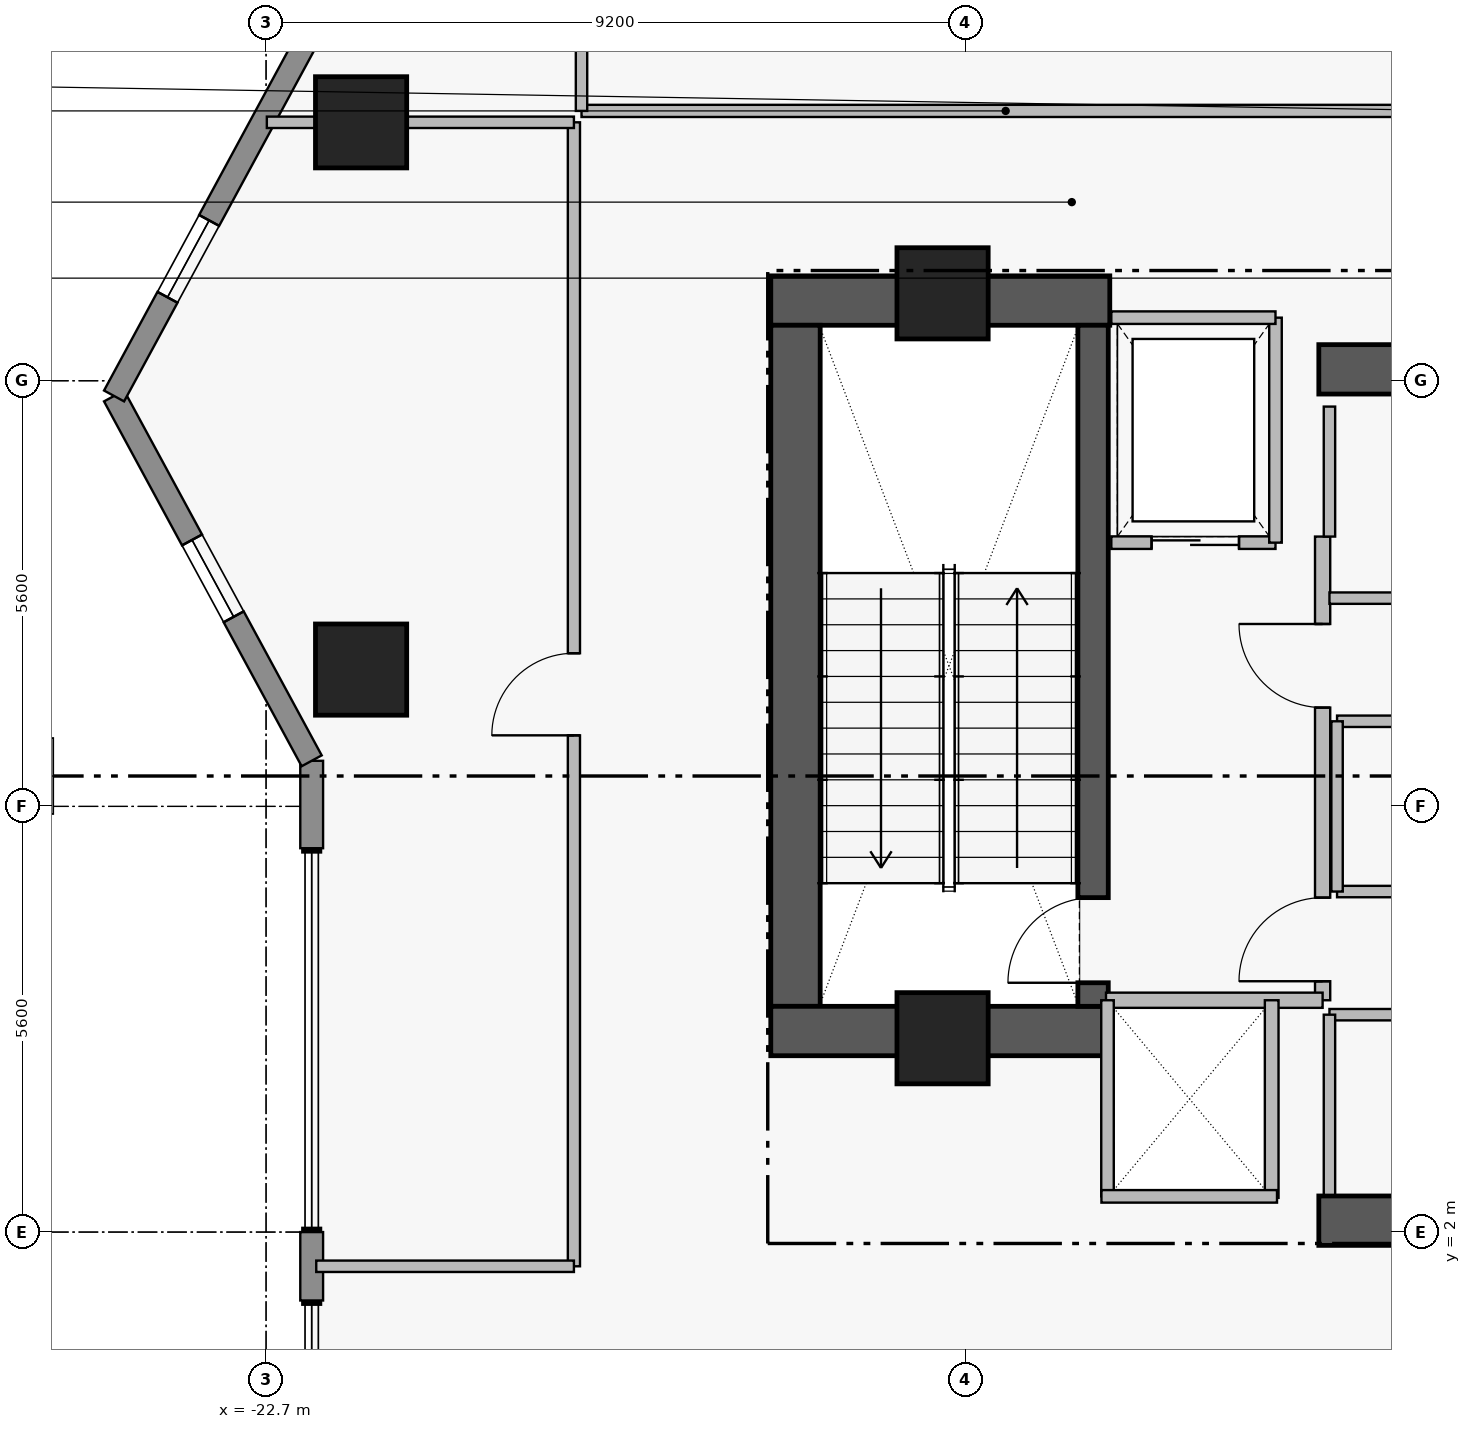
"""IFC4 building model, lengths in metres.
Left out: names, types, materials, properties, quantities, classifications, styles, units other than length and angle.
Written with IfcOpenShell. Run it as: python <this file> out.ifc"""

import sys

from ifc_helpers import new_model, si_unit, direction, frame, frame_2d, origin, origin_2d, place, context, subcontext, project, spatial, rectangle, extrude, element, fill, save


model = new_model("IFC4")
c1 = context("Model", 3, precision=1e-05, world=origin(), true_north=direction((0.0, 1.0)))
c2 = subcontext(c1, "Body", "Model", "MODEL_VIEW")
j1 = project(units=[si_unit("LENGTHUNIT", "METRE"), si_unit("PLANEANGLEUNIT", "RADIAN")], contexts=[c1])
p1 = place(None, origin())
s1 = spatial("IfcSite", under=j1, at=p1, CompositionType="ELEMENT")
p2 = place(p1, origin())
s2 = spatial("IfcBuilding", under=s1, at=p2, CompositionType="ELEMENT")
p3 = place(p2, frame((0.0, 0.0, 168.2)))
s3 = spatial("IfcBuildingStorey", under=s2, at=p3, CompositionType="ELEMENT", Elevation=168.2)
p4 = place(p3, frame((-16.06, 14.255, 0.0), z_axis=(0.0, 0.0, 1.0), x_axis=(1.0, 0.0, 0.0)))
e1 = element("IfcWall", 1, at=p4, inside=s3, PredefinedType="SHEAR", context=c2, shape_type="SweptSolid", body=[
    extrude(rectangle(XDim=4.46, YDim=0.65, at=frame_2d((2.23, 0.0))), origin(), (0.0, 0.0, 1.0), 4.41),
])
p5 = place(p3, frame((-15.735, 4.97, 0.0), z_axis=(0.0, 0.0, 1.0), x_axis=(0.0, 1.0, 0.0)))
e2 = element("IfcWall", 2, at=p5, inside=s3, PredefinedType="SHEAR", context=c2, shape_type="SweptSolid", body=[
    extrude(rectangle(XDim=8.96, YDim=0.65, at=frame_2d((4.48, 0.0))), origin(), (0.0, 0.0, 1.0), 4.41),
])
p6 = place(p3, frame((-16.06, 4.645, 0.0), z_axis=(0.0, 0.0, 1.0), x_axis=(1.0, 0.0, 0.0)))
e3 = element("IfcWall", 3, at=p6, inside=s3, PredefinedType="SHEAR", context=c2, shape_type="SweptSolid", body=[
    extrude(rectangle(XDim=4.46, YDim=0.65, at=frame_2d((2.23, 0.0))), origin(), (0.0, 0.0, 1.0), 4.41),
])
for number, where, z_axis, x_axis in (
    (4, (-8.85, 2.15, 0.0), (0.0, 0.0, 1.0), (1.0, 0.0, 0.0)),
    (5, (-8.85, 13.35, 0.0), (0.0, 0.0, 1.0), (1.0, 0.0, 0.0)),
):
    element("IfcWall", number, at=place(p3, frame(where, z_axis=z_axis, x_axis=x_axis)), inside=s3, PredefinedType="SHEAR", context=c2, shape_type="SweptSolid", body=[
        extrude(rectangle(XDim=7.6, YDim=0.65, at=frame_2d((3.8, 0.0))), origin(), (0.0, 0.0, 1.0), 4.38),
    ])
p7 = place(p3, frame((-11.82, 4.97, 0.0), z_axis=(0.0, 0.0, 1.0), x_axis=(0.0, 1.0, 0.0)))
e6 = element("IfcWall", 6, at=p7, inside=s3, PredefinedType="SHEAR", context=c2, shape_type="SweptSolid", body=[
    extrude(rectangle(XDim=8.96, YDim=0.4, at=frame_2d((4.48, 0.0))), origin(), (0.0, 0.0, 1.0), 4.41),
])
p8 = place(p7, frame((0.31, 0.0, 0.0)))
e7 = element("IfcOpeningElement", 7, at=p8, cuts=e6, PredefinedType="OPENING", context=c2, shape_type="SweptSolid", body=[
    extrude(rectangle(XDim=1.12, YDim=2.22, at=frame_2d((0.56, 1.11))), frame((0.0, 0.21, 0.0), z_axis=(0.0, -1.0, 0.0), x_axis=(1.0, 0.0, 0.0)), (0.0, 0.0, 1.0), 0.42),
])
for number, where, z_axis, x_axis in (
    (8, (-13.8, 14.35, 0.0), (0.0, 0.0, 1.0), (1.0, 0.0, 0.0)),
    (9, (-13.8, 4.55, 0.0), (0.0, 0.0, 1.0), (1.0, 0.0, 0.0)),
):
    element("IfcColumn", number, at=place(p3, frame(where, z_axis=z_axis, x_axis=x_axis)), inside=s3, PredefinedType="COLUMN", context=c2, shape_type="SweptSolid", body=[
        extrude(rectangle(XDim=1.2, YDim=1.2, at=origin_2d()), origin(), (0.0, 0.0, 1.0), 4.6),
    ])
for number, where, z_axis, x_axis in (
    (10, (-21.45, 9.4, 0.43), (0.0, 0.0, 1.0), (1.0, 0.0, 0.0)),
    (11, (-21.45, 16.6, 0.43), (0.0, 0.0, 1.0), (1.0, 0.0, 0.0)),
):
    element("IfcColumn", number, at=place(p3, frame(where, z_axis=z_axis, x_axis=x_axis)), inside=s3, PredefinedType="COLUMN", context=c2, shape_type="SweptSolid", body=[
        extrude(rectangle(XDim=1.2, YDim=1.2, at=origin_2d()), origin(), (0.0, 0.0, 1.0), 4.17),
    ])
p9 = place(p3, frame((-22.1, 1.1, 0.0), z_axis=(0.0, 0.0, 1.0), x_axis=(0.0, 1.0, 0.0)))
e12 = element("IfcWall", 12, at=p9, inside=s3, PredefinedType="STANDARD", context=c2, shape_type="SweptSolid", body=[
    extrude(rectangle(XDim=0.9, YDim=0.3, at=frame_2d((0.45, 0.0))), origin(), (0.0, 0.0, 1.0), 4.38),
])
p10 = place(p3, frame((-22.1, 7.05, 0.0), z_axis=(0.0, 0.0, 1.0), x_axis=(0.0, 1.0, 0.0)))
e13 = element("IfcWall", 13, at=p10, inside=s3, PredefinedType="STANDARD", context=c2, shape_type="SweptSolid", body=[
    extrude(rectangle(XDim=1.15, YDim=0.3, at=frame_2d((0.575, 0.0))), origin(), (0.0, 0.0, 1.0), 4.38),
])
p11 = place(p3, frame((-22.1, 8.2, 0.0), z_axis=(0.0, 0.0, 1.0), x_axis=(-0.476258655584, 0.879305233114, 0.0)))
e14 = element("IfcWall", 14, at=p11, inside=s3, PredefinedType="STANDARD", context=c2, shape_type="SweptSolid", body=[
    extrude(rectangle(XDim=5.459, YDim=0.3, at=frame_2d((2.729, 0.0))), origin(), (0.0, 0.0, 1.0), 4.38),
])
p12 = place(p11, frame((2.155, 0.0, 1.25)))
e15 = element("IfcOpeningElement", 15, at=p12, cuts=e14, PredefinedType="OPENING", context=c2, shape_type="SweptSolid", body=[
    extrude(rectangle(XDim=1.15, YDim=1.55, at=frame_2d((0.575, 0.775))), frame((0.0, 0.16, 0.0), z_axis=(0.0, -1.0, 0.0), x_axis=(1.0, 0.0, 0.0)), (0.0, 0.0, 1.0), 0.32),
])
p13 = place(p3, frame((-24.7, 13.0, 0.0), z_axis=(0.0, 0.0, 1.0), x_axis=(0.476258655584, 0.879305233114, 0.0)))
e16 = element("IfcWall", 16, at=p13, inside=s3, PredefinedType="STANDARD", context=c2, shape_type="SweptSolid", body=[
    extrude(rectangle(XDim=5.459, YDim=0.3, at=frame_2d((2.729, 0.0))), origin(), (0.0, 0.0, 1.0), 4.38),
])
p14 = place(p13, frame((1.476, 0.0, 1.25)))
e17 = element("IfcOpeningElement", 17, at=p14, cuts=e16, PredefinedType="OPENING", context=c2, shape_type="SweptSolid", body=[
    extrude(rectangle(XDim=1.15, YDim=1.55, at=frame_2d((0.575, 0.775))), frame((0.0, 0.16, 0.0), z_axis=(0.0, -1.0, 0.0), x_axis=(1.0, 0.0, 0.0)), (0.0, 0.0, 1.0), 0.32),
])
p15 = place(p3, frame((-8.8, 5.05, 0.0), z_axis=(0.0, 0.0, 1.0), x_axis=(0.0, 1.0, 0.0)))
e18 = element("IfcWall", 18, at=p15, inside=s3, PredefinedType="PARTITIONING", context=c2, shape_type="SweptSolid", body=[
    extrude(rectangle(XDim=6.1, YDim=0.2, at=frame_2d((3.05, 0.0))), origin(), (0.0, 0.0, 1.0), 4.38),
])
p16 = place(p15, frame((0.25, 0.0, 0.0)))
e19 = element("IfcOpeningElement", 19, at=p16, cuts=e18, PredefinedType="OPENING", context=c2, shape_type="SweptSolid", body=[
    extrude(rectangle(XDim=1.1, YDim=2.2, at=frame_2d((0.55, 1.1))), frame((0.0, 0.11, 0.0), z_axis=(0.0, -1.0, 0.0), x_axis=(1.0, 0.0, 0.0)), (0.0, 0.0, 1.0), 0.22),
])
p17 = place(p15, frame((3.85, 0.0, 0.0)))
e20 = element("IfcOpeningElement", 20, at=p17, cuts=e18, PredefinedType="OPENING", context=c2, shape_type="SweptSolid", body=[
    extrude(rectangle(XDim=1.1, YDim=2.2, at=frame_2d((0.55, 1.1))), frame((0.0, 0.11, 0.0), z_axis=(0.0, -1.0, 0.0), x_axis=(1.0, 0.0, 0.0)), (0.0, 0.0, 1.0), 0.22),
])
p18 = place(p3, frame((-11.58, 11.07, 0.0), z_axis=(0.0, 0.0, 1.0), x_axis=(1.0, 0.0, 0.0)))
e21 = element("IfcWall", 21, at=p18, inside=s3, PredefinedType="PARTITIONING", context=c2, shape_type="SweptSolid", body=[
    extrude(rectangle(XDim=2.16, YDim=0.165, at=frame_2d((1.08, 0.0))), origin(), (0.0, 0.0, 1.0), 4.38),
])
p19 = place(p18, frame((0.53, 0.0, 0.0)))
e22 = element("IfcOpeningElement", 22, at=p19, cuts=e21, PredefinedType="OPENING", context=c2, shape_type="SweptSolid", body=[
    extrude(rectangle(XDim=1.15, YDim=2.25, at=frame_2d((0.575, 1.125))), frame((0.0, 0.093, 0.0), z_axis=(0.0, -1.0, 0.0), x_axis=(1.0, 0.0, 0.0)), (0.0, 0.0, 1.0), 0.185),
])
p20 = place(p3, frame((-8.71, 4.86, 0.0), z_axis=(0.0, 0.0, 1.0), x_axis=(1.0, 0.0, 0.0)))
e23 = element("IfcWall", 23, at=p20, inside=s3, PredefinedType="PARTITIONING", context=c2, shape_type="SweptSolid", body=[
    extrude(rectangle(XDim=4.92, YDim=0.15, at=frame_2d((2.46, 0.0))), origin(), (0.0, 0.0, 1.0), 4.38),
])
p21 = place(p20, frame((2.01, 0.0, 0.0)))
e24 = element("IfcOpeningElement", 24, at=p21, cuts=e23, PredefinedType="OPENING", context=c2, shape_type="SweptSolid", body=[
    extrude(rectangle(XDim=0.9, YDim=2.15, at=frame_2d((0.45, 1.075))), frame((0.0, 0.085, 0.0), z_axis=(0.0, -1.0, 0.0), x_axis=(1.0, 0.0, 0.0)), (0.0, 0.0, 1.0), 0.17),
])
p22 = place(p3, frame((-8.71, 10.34, 0.0), z_axis=(0.0, 0.0, 1.0), x_axis=(1.0, 0.0, 0.0)))
e25 = element("IfcWall", 25, at=p22, inside=s3, PredefinedType="PARTITIONING", context=c2, shape_type="SweptSolid", body=[
    extrude(rectangle(XDim=4.52, YDim=0.15, at=frame_2d((2.26, 0.0))), origin(), (0.0, 0.0, 1.0), 4.38),
])
p23 = place(p22, frame((1.81, 0.0, 0.0)))
e26 = element("IfcOpeningElement", 26, at=p23, cuts=e25, PredefinedType="OPENING", context=c2, shape_type="SweptSolid", body=[
    extrude(rectangle(XDim=0.9, YDim=2.15, at=frame_2d((0.45, 1.075))), frame((0.0, 0.085, 0.0), z_axis=(0.0, -1.0, 0.0), x_axis=(1.0, 0.0, 0.0)), (0.0, 0.0, 1.0), 0.17),
])
p24 = place(p3, frame((-8.61, 6.48, 0.0), z_axis=(0.0, 0.0, 1.0), x_axis=(1.0, 0.0, 0.0)))
e27 = element("IfcWall", 27, at=p24, inside=s3, PredefinedType="PARTITIONING", context=c2, shape_type="SweptSolid", body=[
    extrude(rectangle(XDim=7.29, YDim=0.15, at=frame_2d((3.645, 0.0))), origin(), (0.0, 0.0, 1.0), 4.38),
])
p25 = place(p24, frame((3.195, 0.0, 0.0)))
e28 = element("IfcOpeningElement", 28, at=p25, cuts=e27, PredefinedType="OPENING", context=c2, shape_type="SweptSolid", body=[
    extrude(rectangle(XDim=0.9, YDim=2.15, at=frame_2d((0.45, 1.075))), frame((0.0, 0.085, 0.0), z_axis=(0.0, -1.0, 0.0), x_axis=(1.0, 0.0, 0.0)), (0.0, 0.0, 1.0), 0.17),
])
p26 = place(p3, frame((-18.55, 16.75, 0.0), z_axis=(0.0, 0.0, 1.0), x_axis=(1.0, 0.0, 0.0)))
e29 = element("IfcWall", 29, at=p26, inside=s3, PredefinedType="PARTITIONING", context=c2, shape_type="SweptSolid", body=[
    extrude(rectangle(XDim=17.57, YDim=0.16, at=frame_2d((8.785, 0.0))), origin(), (0.0, 0.0, 1.0), 3.974),
])
p27 = place(p26, frame((11.16, 0.0, 0.0)))
e30 = element("IfcOpeningElement", 30, at=p27, cuts=e29, PredefinedType="OPENING", context=c2, shape_type="SweptSolid", body=[
    extrude(rectangle(XDim=1.08, YDim=2.18, at=frame_2d((0.54, 1.09))), frame((0.0, 0.09, 0.0), z_axis=(0.0, -1.0, 0.0), x_axis=(1.0, 0.0, 0.0)), (0.0, 0.0, 1.0), 0.18),
])
p28 = place(p3, frame((-18.65, 1.55, 0.0), z_axis=(0.0, 0.0, 1.0), x_axis=(0.0, 1.0, 0.0)))
e31 = element("IfcWall", 31, at=p28, inside=s3, PredefinedType="PARTITIONING", context=c2, shape_type="SweptSolid", body=[
    extrude(rectangle(XDim=15.05, YDim=0.16, at=frame_2d((7.525, 0.0))), origin(), (0.0, 0.0, 1.0), 4.38),
])
p29 = place(p28, frame((6.985, 0.0, 0.0)))
e32 = element("IfcOpeningElement", 32, at=p29, cuts=e31, PredefinedType="OPENING", context=c2, shape_type="SweptSolid", body=[
    extrude(rectangle(XDim=1.08, YDim=2.18, at=frame_2d((0.54, 1.09))), frame((0.0, 0.09, 0.0), z_axis=(0.0, -1.0, 0.0), x_axis=(1.0, 0.0, 0.0)), (0.0, 0.0, 1.0), 0.18),
])
p30 = place(p3, frame((-11.65, 5.05, 0.0), z_axis=(0.0, 0.0, 1.0), x_axis=(1.0, 0.0, 0.0)))
e33 = element("IfcWall", 33, at=p30, inside=s3, PredefinedType="PARTITIONING", context=c2, shape_type="SweptSolid", body=[
    extrude(rectangle(XDim=2.85, YDim=0.2, at=frame_2d((1.425, 0.0))), origin(), (0.0, 0.0, 1.0), 4.38),
])
p31 = place(p3, frame((-9.42, 11.07, 0.0), z_axis=(0.0, 0.0, 1.0), x_axis=(0.0, 1.0, 0.0)))
e34 = element("IfcWall", 34, at=p31, inside=s3, PredefinedType="PARTITIONING", context=c2, shape_type="SweptSolid", body=[
    extrude(rectangle(XDim=2.96, YDim=0.165, at=frame_2d((1.48, 0.0))), origin(), (0.0, 0.0, 1.0), 4.38),
])
p32 = place(p3, frame((-11.58, 14.03, 0.0), z_axis=(0.0, 0.0, 1.0), x_axis=(1.0, 0.0, 0.0)))
e35 = element("IfcWall", 35, at=p32, inside=s3, PredefinedType="PARTITIONING", context=c2, shape_type="SweptSolid", body=[
    extrude(rectangle(XDim=2.16, YDim=0.165, at=frame_2d((1.08, 0.0))), origin(), (0.0, 0.0, 1.0), 4.38),
])
p33 = place(p3, frame((-8.71, 2.49, 0.0), z_axis=(0.0, 0.0, 1.0), x_axis=(0.0, 1.0, 0.0)))
e36 = element("IfcWall", 36, at=p33, inside=s3, PredefinedType="PARTITIONING", context=c2, shape_type="SweptSolid", body=[
    extrude(rectangle(XDim=2.37, YDim=0.15, at=frame_2d((1.185, 0.0))), origin(), (0.0, 0.0, 1.0), 4.38),
])
p34 = place(p3, frame((-8.71, 11.15, 0.0), z_axis=(0.0, 0.0, 1.0), x_axis=(0.0, 1.0, 0.0)))
e37 = element("IfcWall", 37, at=p34, inside=s3, PredefinedType="PARTITIONING", context=c2, shape_type="SweptSolid", body=[
    extrude(rectangle(XDim=1.71, YDim=0.15, at=frame_2d((0.855, 0.0))), origin(), (0.0, 0.0, 1.0), 4.38),
])
p35 = place(p3, frame((-9.47, 2.45, 0.0), z_axis=(0.0, 0.0, 1.0), x_axis=(0.0, 1.0, 0.0)))
e38 = element("IfcWall", 38, at=p35, inside=s3, PredefinedType="PARTITIONING", context=c2, shape_type="SweptSolid", body=[
    extrude(rectangle(XDim=2.6, YDim=0.18, at=frame_2d((1.3, 0.0))), origin(), (0.0, 0.0, 1.0), 4.38),
])
p36 = place(p3, frame((-11.63, 2.47, 0.0), z_axis=(0.0, 0.0, 1.0), x_axis=(0.0, 1.0, 0.0)))
e39 = element("IfcWall", 39, at=p36, inside=s3, PredefinedType="PARTITIONING", context=c2, shape_type="SweptSolid", body=[
    extrude(rectangle(XDim=2.58, YDim=0.165, at=frame_2d((1.29, 0.0))), origin(), (0.0, 0.0, 1.0), 4.38),
])
p37 = place(p3, frame((-11.71, 2.47, 0.0), z_axis=(0.0, 0.0, 1.0), x_axis=(1.0, 0.0, 0.0)))
e40 = element("IfcWall", 40, at=p37, inside=s3, PredefinedType="PARTITIONING", context=c2, shape_type="SweptSolid", body=[
    extrude(rectangle(XDim=2.31, YDim=0.165, at=frame_2d((1.155, 0.0))), origin(), (0.0, 0.0, 1.0), 3.28),
])
p38 = place(p3, frame((-8.61, 8.72, 0.0), z_axis=(0.0, 0.0, 1.0), x_axis=(1.0, 0.0, 0.0)))
e41 = element("IfcWall", 41, at=p38, inside=s3, PredefinedType="PARTITIONING", context=c2, shape_type="SweptSolid", body=[
    extrude(rectangle(XDim=7.29, YDim=0.15, at=frame_2d((3.645, 0.0))), origin(), (0.0, 0.0, 1.0), 4.38),
])
p39 = place(p3, frame((-8.61, 6.48, 0.0), z_axis=(0.0, 0.0, 1.0), x_axis=(0.0, 1.0, 0.0)))
e42 = element("IfcWall", 42, at=p39, inside=s3, PredefinedType="PARTITIONING", context=c2, shape_type="SweptSolid", body=[
    extrude(rectangle(XDim=2.24, YDim=0.15, at=frame_2d((1.12, 0.0))), origin(), (0.0, 0.0, 1.0), 4.38),
])
p40 = place(p3, frame((-18.55, 16.75, 0.0), z_axis=(0.0, 0.0, 1.0), x_axis=(0.0, 1.0, 0.0)))
e43 = element("IfcWall", 43, at=p40, inside=s3, PredefinedType="PARTITIONING", context=c2, shape_type="SweptSolid", body=[
    extrude(rectangle(XDim=8.2, YDim=0.15, at=frame_2d((4.1, 0.0))), origin(), (0.0, 0.0, 1.0), 4.38),
])
p41 = place(p3, frame((-22.04, 1.55, 0.0), z_axis=(0.0, 0.0, 1.0), x_axis=(1.0, 0.0, 0.0)))
e44 = element("IfcWall", 44, at=p41, inside=s3, PredefinedType="PARTITIONING", context=c2, shape_type="SweptSolid", body=[
    extrude(rectangle(XDim=3.39, YDim=0.15, at=frame_2d((1.695, 0.0))), origin(), (0.0, 0.0, 1.0), 4.38),
])
p42 = place(p3, frame((-22.69, 16.6, 0.0), z_axis=(0.0, 0.0, 1.0), x_axis=(1.0, 0.0, 0.0)))
e45 = element("IfcWall", 45, at=p42, inside=s3, PredefinedType="PARTITIONING", context=c2, shape_type="SweptSolid", body=[
    extrude(rectangle(XDim=4.04, YDim=0.15, at=frame_2d((2.02, 0.0))), origin(), (0.0, 0.0, 1.0), 4.38),
])
p43 = place(p12, origin())
e46 = element("IfcWindow", 46, at=p43, inside=s3, PartitioningType="SINGLE_PANEL", PredefinedType="WINDOW", context=c2, shape_type="SweptSolid", body=[
    extrude(rectangle(XDim=1.15, YDim=1.55, at=frame_2d((0.575, 0.775))), frame((0.0, 0.03, 0.0), z_axis=(0.0, -1.0, 0.0), x_axis=(1.0, 0.0, 0.0)), (0.0, 0.0, 1.0), 0.06),
])
fill(e15, e46)
p44 = place(p14, origin())
e47 = element("IfcWindow", 47, at=p44, inside=s3, PartitioningType="SINGLE_PANEL", PredefinedType="WINDOW", context=c2, shape_type="SweptSolid", body=[
    extrude(rectangle(XDim=1.15, YDim=1.55, at=frame_2d((0.575, 0.775))), frame((0.0, 0.03, 0.0), z_axis=(0.0, -1.0, 0.0), x_axis=(1.0, 0.0, 0.0)), (0.0, 0.0, 1.0), 0.06),
])
fill(e17, e47)
p45 = place(p8, origin())
e48 = element("IfcDoor", 48, at=p45, inside=s3, OperationType="SINGLE_SWING_LEFT", PredefinedType="DOOR", context=c2, shape_type="SweptSolid", body=[
    extrude(rectangle(XDim=1.12, YDim=2.22, at=frame_2d((0.56, 1.11))), frame((0.0, 0.025, 0.0), z_axis=(0.0, -1.0, 0.0), x_axis=(1.0, 0.0, 0.0)), (0.0, 0.0, 1.0), 0.05),
])
fill(e7, e48)
p46 = place(p16, origin())
e49 = element("IfcDoor", 49, at=p46, inside=s3, OperationType="SINGLE_SWING_LEFT", PredefinedType="DOOR", context=c2, shape_type="SweptSolid", body=[
    extrude(rectangle(XDim=1.1, YDim=2.2, at=frame_2d((0.55, 1.1))), frame((0.0, 0.025, 0.0), z_axis=(0.0, -1.0, 0.0), x_axis=(1.0, 0.0, 0.0)), (0.0, 0.0, 1.0), 0.05),
])
fill(e19, e49)
p47 = place(p17, origin())
e50 = element("IfcDoor", 50, at=p47, inside=s3, OperationType="SINGLE_SWING_RIGHT", PredefinedType="DOOR", context=c2, shape_type="SweptSolid", body=[
    extrude(rectangle(XDim=1.1, YDim=2.2, at=frame_2d((0.55, 1.1))), frame((0.0, 0.025, 0.0), z_axis=(0.0, -1.0, 0.0), x_axis=(1.0, 0.0, 0.0)), (0.0, 0.0, 1.0), 0.05),
])
fill(e20, e50)
p48 = place(p19, origin())
e51 = element("IfcDoor", 51, at=p48, inside=s3, OperationType="SLIDING_TO_LEFT", PredefinedType="DOOR", context=c2, shape_type="SweptSolid", body=[
    extrude(rectangle(XDim=1.15, YDim=2.25, at=frame_2d((0.575, 1.125))), frame((0.0, 0.025, 0.0), z_axis=(0.0, -1.0, 0.0), x_axis=(1.0, 0.0, 0.0)), (0.0, 0.0, 1.0), 0.05),
])
fill(e22, e51)
p49 = place(p29, origin())
e52 = element("IfcDoor", 52, at=p49, inside=s3, OperationType="SINGLE_SWING_LEFT", PredefinedType="DOOR", context=c2, shape_type="SweptSolid", body=[
    extrude(rectangle(XDim=1.08, YDim=2.18, at=frame_2d((0.54, 1.09))), frame((0.0, 0.025, 0.0), z_axis=(0.0, -1.0, 0.0), x_axis=(1.0, 0.0, 0.0)), (0.0, 0.0, 1.0), 0.05),
])
fill(e32, e52)
save(model, sys.argv[1])
